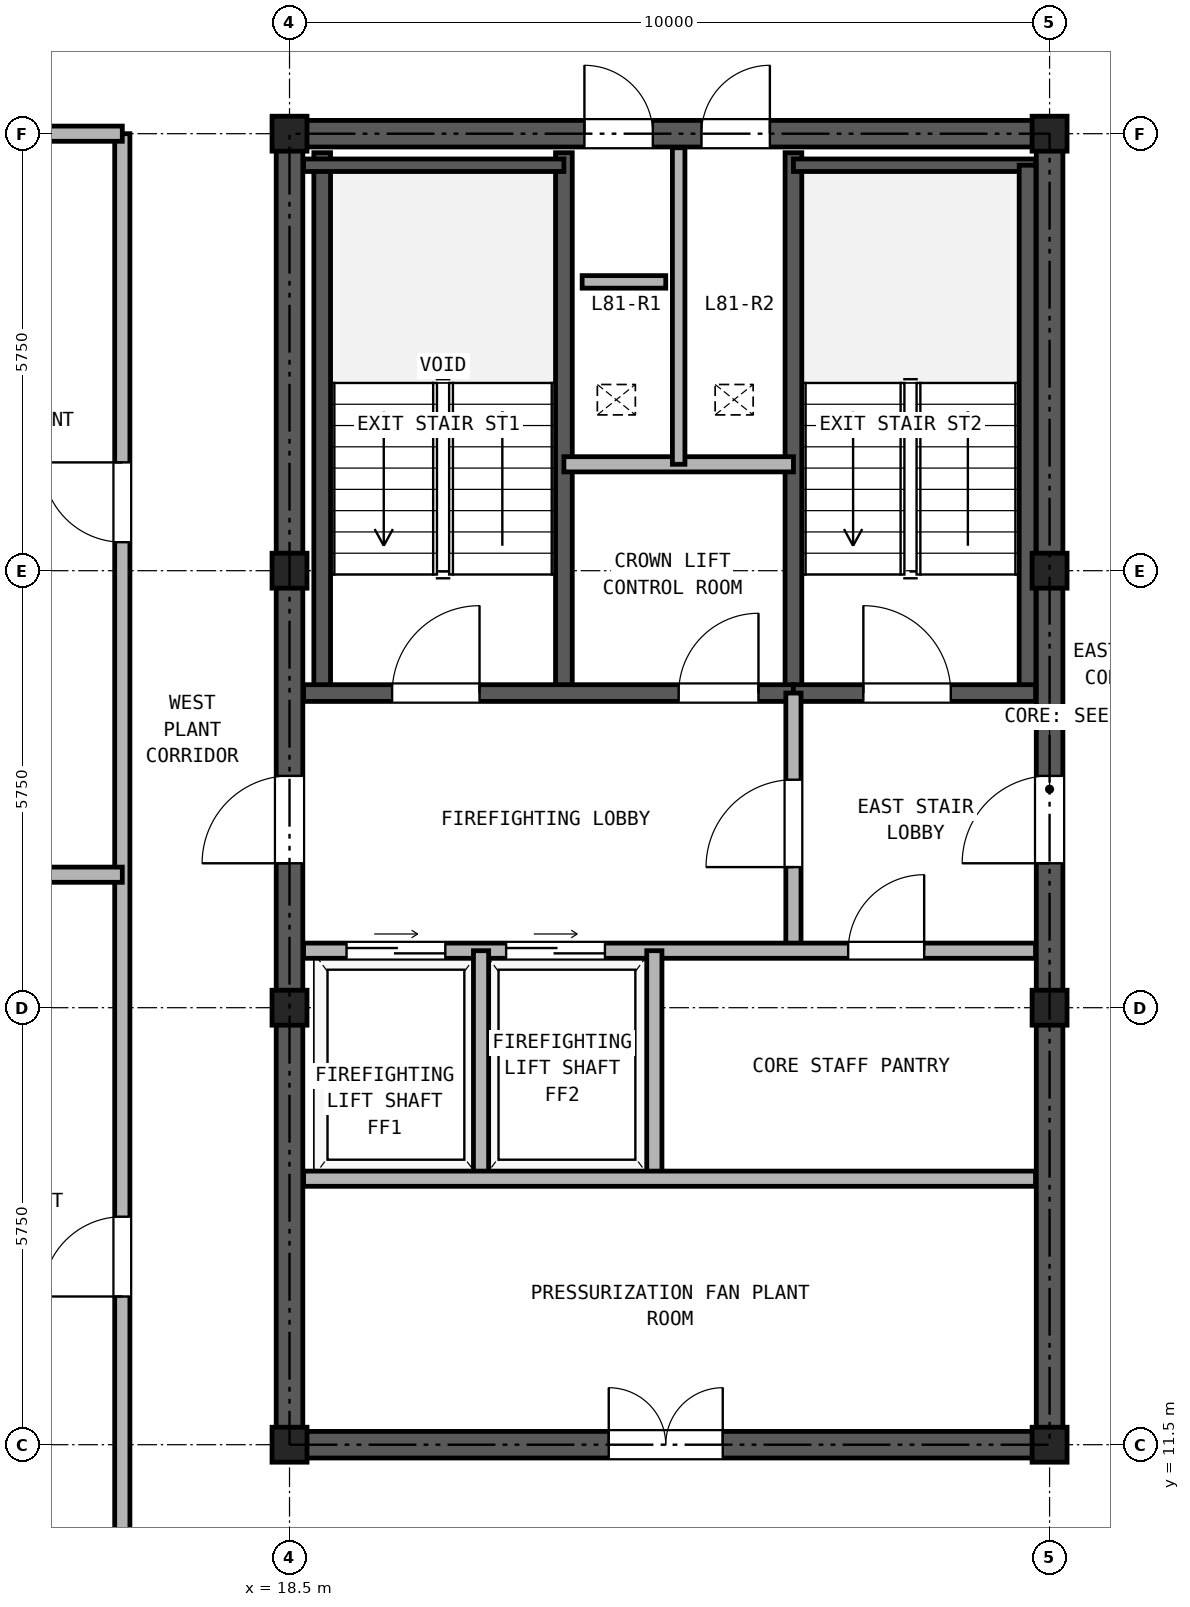
"""IFC4 building model, lengths in metres.
Left out: names, types, materials, properties, quantities, classifications, styles, units other than length and angle.
Written with IfcOpenShell. Run it as: python <this file> out.ifc"""

import sys

from ifc_helpers import new_model, si_unit, direction, frame, frame_2d, origin, origin_2d, place, context, subcontext, project, spatial, rectangle, hollow_rectangle, extrude, source, transform, mapped, element, fill, save


model = new_model("IFC4")
c1 = context("Model", 3, precision=1e-05, world=origin(), true_north=direction((0.0, 1.0)))
c2 = subcontext(c1, "Body", "Model", "MODEL_VIEW")
j1 = project(units=[si_unit("LENGTHUNIT", "METRE"), si_unit("PLANEANGLEUNIT", "RADIAN")], contexts=[c1])
p1 = place(None, origin())
s1 = spatial("IfcSite", under=j1, at=p1, CompositionType="ELEMENT")
p2 = place(p1, origin())
s2 = spatial("IfcBuilding", under=s1, at=p2, CompositionType="ELEMENT")
p3 = place(p2, frame((0.0, 0.0, 282.1)))
s3 = spatial("IfcBuildingStorey", under=s2, at=p3, CompositionType="ELEMENT", Elevation=282.1)
m1 = source(origin(), c2, "Body", "SweptSolid", [
    extrude(hollow_rectangle(XDim=0.46, YDim=0.46, WallThickness=0.025, at=origin_2d()), origin(), (0.0, 0.0, 1.0), 3.38),
])
for number, where, z_axis, x_axis in (
    (1, (18.5, 11.5, 0.0), (0.0, 0.0, 1.0), (1.0, 0.0, 0.0)),
    (2, (18.5, 17.25, 0.0), (0.0, 0.0, 1.0), (1.0, 0.0, 0.0)),
    (3, (18.5, 23.0, 0.0), (0.0, 0.0, 1.0), (1.0, 0.0, 0.0)),
    (4, (18.5, 28.75, 0.0), (0.0, 0.0, 1.0), (1.0, 0.0, 0.0)),
    (5, (28.5, 11.5, 0.0), (0.0, 0.0, 1.0), (1.0, 0.0, 0.0)),
    (6, (28.5, 17.25, 0.0), (0.0, 0.0, 1.0), (1.0, 0.0, 0.0)),
    (7, (28.5, 23.0, 0.0), (0.0, 0.0, 1.0), (1.0, 0.0, 0.0)),
    (8, (28.5, 28.75, 0.0), (0.0, 0.0, 1.0), (1.0, 0.0, 0.0)),
):
    element("IfcColumn", number, at=place(p3, frame(where, z_axis=z_axis, x_axis=x_axis)), inside=s3, PredefinedType="COLUMN", context=c2, shape_type="MappedRepresentation", body=[
        mapped(m1, transform((0.0, 0.0, 0.0), x_axis=(1.0, 0.0, 0.0), y_axis=(0.0, 1.0, 0.0), z_axis=(0.0, 0.0, 1.0), scale=1.0)),
    ])
p4 = place(p3, frame((18.325, 11.5, 0.0), z_axis=(0.0, 0.0, 1.0), x_axis=(1.0, 0.0, 0.0)))
e9 = element("IfcWall", 9, at=p4, inside=s3, PredefinedType="SHEAR", context=c2, shape_type="SweptSolid", body=[
    extrude(rectangle(XDim=10.35, YDim=0.35, at=frame_2d((5.175, 0.0))), origin(), (0.0, 0.0, 1.0), 3.38),
])
p5 = place(p4, frame((4.375, 0.0, 0.0)))
e10 = element("IfcOpeningElement", 10, at=p5, cuts=e9, PredefinedType="OPENING", context=c2, shape_type="SweptSolid", body=[
    extrude(rectangle(XDim=1.5, YDim=2.25, at=frame_2d((0.75, 1.125))), frame((0.0, 0.185, 0.0), z_axis=(0.0, -1.0, 0.0), x_axis=(1.0, 0.0, 0.0)), (0.0, 0.0, 1.0), 0.37),
])
p6 = place(p3, frame((18.325, 28.75, 0.0), z_axis=(0.0, 0.0, 1.0), x_axis=(1.0, 0.0, 0.0)))
e11 = element("IfcWall", 11, at=p6, inside=s3, PredefinedType="SHEAR", context=c2, shape_type="SweptSolid", body=[
    extrude(rectangle(XDim=10.35, YDim=0.35, at=frame_2d((5.175, 0.0))), origin(), (0.0, 0.0, 1.0), 3.38),
])
p7 = place(p6, frame((4.055, 0.0, 0.0)))
e12 = element("IfcOpeningElement", 12, at=p7, cuts=e11, PredefinedType="OPENING", context=c2, shape_type="SweptSolid", body=[
    extrude(rectangle(XDim=0.9, YDim=2.05, at=frame_2d((0.45, 1.025))), frame((0.0, 0.185, 0.0), z_axis=(0.0, -1.0, 0.0), x_axis=(1.0, 0.0, 0.0)), (0.0, 0.0, 1.0), 0.37),
])
p8 = place(p6, frame((5.595, 0.0, 0.0)))
e13 = element("IfcOpeningElement", 13, at=p8, cuts=e11, PredefinedType="OPENING", context=c2, shape_type="SweptSolid", body=[
    extrude(rectangle(XDim=0.9, YDim=2.05, at=frame_2d((0.45, 1.025))), frame((0.0, 0.185, 0.0), z_axis=(0.0, -1.0, 0.0), x_axis=(1.0, 0.0, 0.0)), (0.0, 0.0, 1.0), 0.37),
])
p9 = place(p3, frame((18.5, 11.675, 0.0), z_axis=(0.0, 0.0, 1.0), x_axis=(0.0, 1.0, 0.0)))
e14 = element("IfcWall", 14, at=p9, inside=s3, PredefinedType="SHEAR", context=c2, shape_type="SweptSolid", body=[
    extrude(rectangle(XDim=16.9, YDim=0.35, at=frame_2d((8.45, 0.0))), origin(), (0.0, 0.0, 1.0), 3.38),
])
p10 = place(p9, frame((7.475, 0.0, 0.0)))
e15 = element("IfcOpeningElement", 15, at=p10, cuts=e14, PredefinedType="OPENING", context=c2, shape_type="SweptSolid", body=[
    extrude(rectangle(XDim=1.15, YDim=2.2, at=frame_2d((0.575, 1.1))), frame((0.0, 0.185, 0.0), z_axis=(0.0, -1.0, 0.0), x_axis=(1.0, 0.0, 0.0)), (0.0, 0.0, 1.0), 0.37),
])
p11 = place(p3, frame((28.5, 11.675, 0.0), z_axis=(0.0, 0.0, 1.0), x_axis=(0.0, 1.0, 0.0)))
e16 = element("IfcWall", 16, at=p11, inside=s3, PredefinedType="SHEAR", context=c2, shape_type="SweptSolid", body=[
    extrude(rectangle(XDim=16.9, YDim=0.35, at=frame_2d((8.45, 0.0))), origin(), (0.0, 0.0, 1.0), 3.38),
])
p12 = place(p11, frame((7.475, 0.0, 0.0)))
e17 = element("IfcOpeningElement", 17, at=p12, cuts=e16, PredefinedType="OPENING", context=c2, shape_type="SweptSolid", body=[
    extrude(rectangle(XDim=1.15, YDim=2.2, at=frame_2d((0.575, 1.1))), frame((0.0, 0.185, 0.0), z_axis=(0.0, -1.0, 0.0), x_axis=(1.0, 0.0, 0.0)), (0.0, 0.0, 1.0), 0.37),
])
for number, where, z_axis, x_axis in (
    (18, (18.93, 21.39, 0.0), (0.0, 0.0, 1.0), (0.0, 1.0, 0.0)),
    (19, (22.11, 21.39, 0.0), (0.0, 0.0, 1.0), (0.0, 1.0, 0.0)),
    (20, (25.13, 21.39, 0.0), (0.0, 0.0, 1.0), (0.0, 1.0, 0.0)),
):
    element("IfcWall", number, at=place(p3, frame(where, z_axis=z_axis, x_axis=x_axis)), inside=s3, PredefinedType="SOLIDWALL", context=c2, shape_type="SweptSolid", body=[
        extrude(rectangle(XDim=7.11, YDim=0.22, at=frame_2d((3.555, 0.0))), origin(), (0.0, 0.0, 1.0), 3.38),
    ])
p13 = place(p3, frame((18.685, 28.335, 0.0), z_axis=(0.0, 0.0, 1.0), x_axis=(1.0, 0.0, 0.0)))
e21 = element("IfcWall", 21, at=p13, inside=s3, PredefinedType="PARTITIONING", context=c2, shape_type="SweptSolid", body=[
    extrude(rectangle(XDim=3.425, YDim=0.165, at=frame_2d((1.712, 0.0))), origin(), (0.0, 0.0, 1.0), 3.38),
])
p14 = place(p3, frame((25.13, 28.335, 0.0), z_axis=(0.0, 0.0, 1.0), x_axis=(1.0, 0.0, 0.0)))
e22 = element("IfcWall", 22, at=p14, inside=s3, PredefinedType="PARTITIONING", context=c2, shape_type="SweptSolid", body=[
    extrude(rectangle(XDim=3.185, YDim=0.165, at=frame_2d((1.593, 0.0))), origin(), (0.0, 0.0, 1.0), 3.38),
])
p15 = place(p3, frame((28.21, 21.39, 0.0), z_axis=(0.0, 0.0, 1.0), x_axis=(0.0, 1.0, 0.0)))
e23 = element("IfcWall", 23, at=p15, inside=s3, PredefinedType="SOLIDWALL", context=c2, shape_type="SweptSolid", body=[
    extrude(rectangle(XDim=6.945, YDim=0.22, at=frame_2d((3.473, 0.0))), origin(), (0.0, 0.0, 1.0), 3.38),
])
p16 = place(p3, frame((18.685, 21.39, 0.0), z_axis=(0.0, 0.0, 1.0), x_axis=(1.0, 0.0, 0.0)))
e24 = element("IfcWall", 24, at=p16, inside=s3, PredefinedType="SOLIDWALL", context=c2, shape_type="SweptSolid", body=[
    extrude(rectangle(XDim=6.445, YDim=0.22, at=frame_2d((3.222, 0.0))), origin(), (0.0, 0.0, 1.0), 3.38),
])
p17 = place(p16, frame((1.165, 0.0, 0.0)))
e25 = element("IfcOpeningElement", 25, at=p17, cuts=e24, PredefinedType="OPENING", context=c2, shape_type="SweptSolid", body=[
    extrude(rectangle(XDim=1.15, YDim=2.2, at=frame_2d((0.575, 1.1))), frame((0.0, 0.12, 0.0), z_axis=(0.0, -1.0, 0.0), x_axis=(1.0, 0.0, 0.0)), (0.0, 0.0, 1.0), 0.24),
])
p18 = place(p16, frame((4.935, 0.0, 0.0)))
e26 = element("IfcOpeningElement", 26, at=p18, cuts=e24, PredefinedType="OPENING", context=c2, shape_type="SweptSolid", body=[
    extrude(rectangle(XDim=1.05, YDim=2.15, at=frame_2d((0.525, 1.075))), frame((0.0, 0.12, 0.0), z_axis=(0.0, -1.0, 0.0), x_axis=(1.0, 0.0, 0.0)), (0.0, 0.0, 1.0), 0.24),
])
p19 = place(p3, frame((25.13, 21.39, 0.0), z_axis=(0.0, 0.0, 1.0), x_axis=(1.0, 0.0, 0.0)))
e27 = element("IfcWall", 27, at=p19, inside=s3, PredefinedType="SOLIDWALL", context=c2, shape_type="SweptSolid", body=[
    extrude(rectangle(XDim=3.185, YDim=0.22, at=frame_2d((1.593, 0.0))), origin(), (0.0, 0.0, 1.0), 3.38),
])
p20 = place(p19, frame((0.92, 0.0, 0.0)))
e28 = element("IfcOpeningElement", 28, at=p20, cuts=e27, PredefinedType="OPENING", context=c2, shape_type="SweptSolid", body=[
    extrude(rectangle(XDim=1.15, YDim=2.2, at=frame_2d((0.575, 1.1))), frame((0.0, 0.12, 0.0), z_axis=(0.0, -1.0, 0.0), x_axis=(1.0, 0.0, 0.0)), (0.0, 0.0, 1.0), 0.24),
])
p21 = place(p3, frame((22.11, 24.4, 0.0), z_axis=(0.0, 0.0, 1.0), x_axis=(1.0, 0.0, 0.0)))
e29 = element("IfcWall", 29, at=p21, inside=s3, PredefinedType="PARTITIONING", context=c2, shape_type="SweptSolid", body=[
    extrude(rectangle(XDim=3.02, YDim=0.2, at=frame_2d((1.51, 0.0))), origin(), (0.0, 0.0, 1.0), 3.38),
])
p22 = place(p3, frame((23.62, 24.4, 0.0), z_axis=(0.0, 0.0, 1.0), x_axis=(0.0, 1.0, 0.0)))
e30 = element("IfcWall", 30, at=p22, inside=s3, PredefinedType="PARTITIONING", context=c2, shape_type="SweptSolid", body=[
    extrude(rectangle(XDim=4.165, YDim=0.165, at=frame_2d((2.083, 0.0))), origin(), (0.0, 0.0, 1.0), 3.38),
])
p23 = place(p3, frame((25.13, 18.0, 0.0), z_axis=(0.0, 0.0, 1.0), x_axis=(0.0, 1.0, 0.0)))
e31 = element("IfcWall", 31, at=p23, inside=s3, PredefinedType="PARTITIONING", context=c2, shape_type="SweptSolid", body=[
    extrude(rectangle(XDim=3.39, YDim=0.2, at=frame_2d((1.695, 0.0))), origin(), (0.0, 0.0, 1.0), 3.38),
])
p24 = place(p23, frame((1.1, 0.0, 0.0)))
e32 = element("IfcOpeningElement", 32, at=p24, cuts=e31, PredefinedType="OPENING", context=c2, shape_type="SweptSolid", body=[
    extrude(rectangle(XDim=1.15, YDim=2.2, at=frame_2d((0.575, 1.1))), frame((0.0, 0.11, 0.0), z_axis=(0.0, -1.0, 0.0), x_axis=(1.0, 0.0, 0.0)), (0.0, 0.0, 1.0), 0.22),
])
p25 = place(p3, frame((18.685, 18.0, 0.0), z_axis=(0.0, 0.0, 1.0), x_axis=(1.0, 0.0, 0.0)))
e33 = element("IfcWall", 33, at=p25, inside=s3, PredefinedType="PARTITIONING", context=c2, shape_type="SweptSolid", body=[
    extrude(rectangle(XDim=9.63, YDim=0.2, at=frame_2d((4.815, 0.0))), origin(), (0.0, 0.0, 1.0), 3.38),
])
p26 = place(p25, frame((0.565, 0.0, 0.0)))
e34 = element("IfcOpeningElement", 34, at=p26, cuts=e33, PredefinedType="OPENING", context=c2, shape_type="SweptSolid", body=[
    extrude(rectangle(XDim=1.3, YDim=2.3, at=frame_2d((0.65, 1.15))), frame((0.0, 0.11, 0.0), z_axis=(0.0, -1.0, 0.0), x_axis=(1.0, 0.0, 0.0)), (0.0, 0.0, 1.0), 0.22),
])
p27 = place(p25, frame((2.665, 0.0, 0.0)))
e35 = element("IfcOpeningElement", 35, at=p27, cuts=e33, PredefinedType="OPENING", context=c2, shape_type="SweptSolid", body=[
    extrude(rectangle(XDim=1.3, YDim=2.3, at=frame_2d((0.65, 1.15))), frame((0.0, 0.11, 0.0), z_axis=(0.0, -1.0, 0.0), x_axis=(1.0, 0.0, 0.0)), (0.0, 0.0, 1.0), 0.22),
])
p28 = place(p25, frame((7.165, 0.0, 0.0)))
e36 = element("IfcOpeningElement", 36, at=p28, cuts=e33, PredefinedType="OPENING", context=c2, shape_type="SweptSolid", body=[
    extrude(rectangle(XDim=1.0, YDim=2.15, at=frame_2d((0.5, 1.075))), frame((0.0, 0.11, 0.0), z_axis=(0.0, -1.0, 0.0), x_axis=(1.0, 0.0, 0.0)), (0.0, 0.0, 1.0), 0.22),
])
for number, where, z_axis, x_axis in (
    (37, (21.02, 15.0, 0.0), (0.0, 0.0, 1.0), (0.0, 1.0, 0.0)),
    (38, (23.3, 15.0, 0.0), (0.0, 0.0, 1.0), (0.0, 1.0, 0.0)),
):
    element("IfcWall", number, at=place(p3, frame(where, z_axis=z_axis, x_axis=x_axis)), inside=s3, PredefinedType="PARTITIONING", context=c2, shape_type="SweptSolid", body=[
        extrude(rectangle(XDim=3.0, YDim=0.2, at=frame_2d((1.5, 0.0))), origin(), (0.0, 0.0, 1.0), 3.38),
    ])
p29 = place(p3, frame((18.685, 15.0, 0.0), z_axis=(0.0, 0.0, 1.0), x_axis=(1.0, 0.0, 0.0)))
e39 = element("IfcWall", 39, at=p29, inside=s3, PredefinedType="PARTITIONING", context=c2, shape_type="SweptSolid", body=[
    extrude(rectangle(XDim=9.63, YDim=0.2, at=frame_2d((4.815, 0.0))), origin(), (0.0, 0.0, 1.0), 3.38),
])
p30 = place(p3, frame((16.3, 8.9, 0.0), z_axis=(0.0, 0.0, 1.0), x_axis=(0.0, 1.0, 0.0)))
e40 = element("IfcWall", 40, at=p30, inside=s3, PredefinedType="PARTITIONING", context=c2, shape_type="SweptSolid", body=[
    extrude(rectangle(XDim=19.85, YDim=0.2, at=frame_2d((9.925, 0.0))), origin(), (0.0, 0.0, 1.0), 3.38),
])
p31 = place(p30, frame((4.55, 0.0, 0.0)))
e41 = element("IfcOpeningElement", 41, at=p31, cuts=e40, PredefinedType="OPENING", context=c2, shape_type="SweptSolid", body=[
    extrude(rectangle(XDim=1.05, YDim=2.15, at=frame_2d((0.525, 1.075))), frame((0.0, 0.11, 0.0), z_axis=(0.0, -1.0, 0.0), x_axis=(1.0, 0.0, 0.0)), (0.0, 0.0, 1.0), 0.22),
])
p32 = place(p30, frame((14.475, 0.0, 0.0)))
e42 = element("IfcOpeningElement", 42, at=p32, cuts=e40, PredefinedType="OPENING", context=c2, shape_type="SweptSolid", body=[
    extrude(rectangle(XDim=1.05, YDim=2.15, at=frame_2d((0.525, 1.075))), frame((0.0, 0.11, 0.0), z_axis=(0.0, -1.0, 0.0), x_axis=(1.0, 0.0, 0.0)), (0.0, 0.0, 1.0), 0.22),
])
p33 = place(p3, frame((12.45, 28.75, 0.0), z_axis=(0.0, 0.0, 1.0), x_axis=(1.0, 0.0, 0.0)))
e43 = element("IfcWall", 43, at=p33, inside=s3, PredefinedType="PARTITIONING", context=c2, shape_type="SweptSolid", body=[
    extrude(rectangle(XDim=3.85, YDim=0.2, at=frame_2d((1.925, 0.0))), origin(), (0.0, 0.0, 1.0), 2.905),
])
p34 = place(p3, frame((12.45, 19.0, 0.0), z_axis=(0.0, 0.0, 1.0), x_axis=(1.0, 0.0, 0.0)))
e44 = element("IfcWall", 44, at=p34, inside=s3, PredefinedType="PARTITIONING", context=c2, shape_type="SweptSolid", body=[
    extrude(rectangle(XDim=3.85, YDim=0.2, at=frame_2d((1.925, 0.0))), origin(), (0.0, 0.0, 1.0), 3.38),
])
p35 = place(p3, frame((22.35, 26.8, 0.0), z_axis=(0.0, 0.0, 1.0), x_axis=(1.0, 0.0, 0.0)))
e45 = element("IfcWall", 45, at=p35, inside=s3, PredefinedType="PARTITIONING", context=c2, shape_type="SweptSolid", body=[
    extrude(rectangle(XDim=1.1, YDim=0.165, at=frame_2d((0.55, 0.0))), origin(), (0.0, 0.0, 1.0), 3.38),
])
p36 = place(p17, frame((1.15, 0.0, 0.0), z_axis=(0.0, 0.0, 1.0), x_axis=(-1.0, 0.0, 0.0)))
e46 = element("IfcDoor", 46, at=p36, inside=s3, OperationType="SINGLE_SWING_RIGHT", PredefinedType="DOOR", context=c2, shape_type="SweptSolid", body=[
    extrude(rectangle(XDim=1.15, YDim=2.2, at=frame_2d((0.575, 1.1))), frame((0.0, 0.025, 0.0), z_axis=(0.0, -1.0, 0.0), x_axis=(1.0, 0.0, 0.0)), (0.0, 0.0, 1.0), 0.05),
])
fill(e25, e46)
p37 = place(p20, frame((1.15, 0.0, 0.0), z_axis=(0.0, 0.0, 1.0), x_axis=(-1.0, 0.0, 0.0)))
e47 = element("IfcDoor", 47, at=p37, inside=s3, OperationType="SINGLE_SWING_LEFT", PredefinedType="DOOR", context=c2, shape_type="SweptSolid", body=[
    extrude(rectangle(XDim=1.15, YDim=2.2, at=frame_2d((0.575, 1.1))), frame((0.0, 0.025, 0.0), z_axis=(0.0, -1.0, 0.0), x_axis=(1.0, 0.0, 0.0)), (0.0, 0.0, 1.0), 0.05),
])
fill(e28, e47)
p38 = place(p18, origin())
e48 = element("IfcDoor", 48, at=p38, inside=s3, OperationType="SINGLE_SWING_RIGHT", PredefinedType="DOOR", context=c2, shape_type="SweptSolid", body=[
    extrude(rectangle(XDim=1.05, YDim=2.15, at=frame_2d((0.525, 1.075))), frame((0.0, 0.025, 0.0), z_axis=(0.0, -1.0, 0.0), x_axis=(1.0, 0.0, 0.0)), (0.0, 0.0, 1.0), 0.05),
])
fill(e26, e48)
p39 = place(p24, origin())
e49 = element("IfcDoor", 49, at=p39, inside=s3, OperationType="SINGLE_SWING_LEFT", PredefinedType="DOOR", context=c2, shape_type="SweptSolid", body=[
    extrude(rectangle(XDim=1.15, YDim=2.2, at=frame_2d((0.575, 1.1))), frame((0.0, 0.025, 0.0), z_axis=(0.0, -1.0, 0.0), x_axis=(1.0, 0.0, 0.0)), (0.0, 0.0, 1.0), 0.05),
])
fill(e32, e49)
p40 = place(p26, origin())
e50 = element("IfcDoor", 50, at=p40, inside=s3, OperationType="DOUBLE_DOOR_SLIDING", PredefinedType="DOOR", context=c2, shape_type="SweptSolid", body=[
    extrude(rectangle(XDim=1.3, YDim=2.3, at=frame_2d((0.65, 1.15))), frame((0.0, 0.025, 0.0), z_axis=(0.0, -1.0, 0.0), x_axis=(1.0, 0.0, 0.0)), (0.0, 0.0, 1.0), 0.05),
])
fill(e34, e50)
p41 = place(p27, origin())
e51 = element("IfcDoor", 51, at=p41, inside=s3, OperationType="DOUBLE_DOOR_SLIDING", PredefinedType="DOOR", context=c2, shape_type="SweptSolid", body=[
    extrude(rectangle(XDim=1.3, YDim=2.3, at=frame_2d((0.65, 1.15))), frame((0.0, 0.025, 0.0), z_axis=(0.0, -1.0, 0.0), x_axis=(1.0, 0.0, 0.0)), (0.0, 0.0, 1.0), 0.05),
])
fill(e35, e51)
p42 = place(p28, frame((1.0, 0.0, 0.0), z_axis=(0.0, 0.0, 1.0), x_axis=(-1.0, 0.0, 0.0)))
e52 = element("IfcDoor", 52, at=p42, inside=s3, OperationType="SINGLE_SWING_RIGHT", PredefinedType="DOOR", context=c2, shape_type="SweptSolid", body=[
    extrude(rectangle(XDim=1.0, YDim=2.15, at=frame_2d((0.5, 1.075))), frame((0.0, 0.025, 0.0), z_axis=(0.0, -1.0, 0.0), x_axis=(1.0, 0.0, 0.0)), (0.0, 0.0, 1.0), 0.05),
])
fill(e36, e52)
p43 = place(p10, frame((1.15, 0.0, 0.0), z_axis=(0.0, 0.0, 1.0), x_axis=(-1.0, 0.0, 0.0)))
e53 = element("IfcDoor", 53, at=p43, inside=s3, OperationType="SINGLE_SWING_LEFT", PredefinedType="DOOR", context=c2, shape_type="SweptSolid", body=[
    extrude(rectangle(XDim=1.15, YDim=2.2, at=frame_2d((0.575, 1.1))), frame((0.0, 0.025, 0.0), z_axis=(0.0, -1.0, 0.0), x_axis=(1.0, 0.0, 0.0)), (0.0, 0.0, 1.0), 0.05),
])
fill(e15, e53)
p44 = place(p12, origin())
e54 = element("IfcDoor", 54, at=p44, inside=s3, OperationType="SINGLE_SWING_LEFT", PredefinedType="DOOR", context=c2, shape_type="SweptSolid", body=[
    extrude(rectangle(XDim=1.15, YDim=2.2, at=frame_2d((0.575, 1.1))), frame((0.0, 0.025, 0.0), z_axis=(0.0, -1.0, 0.0), x_axis=(1.0, 0.0, 0.0)), (0.0, 0.0, 1.0), 0.05),
])
fill(e17, e54)
p45 = place(p7, origin())
e55 = element("IfcDoor", 55, at=p45, inside=s3, OperationType="SINGLE_SWING_LEFT", PredefinedType="DOOR", context=c2, shape_type="SweptSolid", body=[
    extrude(rectangle(XDim=0.9, YDim=2.05, at=frame_2d((0.45, 1.025))), frame((0.0, 0.025, 0.0), z_axis=(0.0, -1.0, 0.0), x_axis=(1.0, 0.0, 0.0)), (0.0, 0.0, 1.0), 0.05),
])
fill(e12, e55)
p46 = place(p8, origin())
e56 = element("IfcDoor", 56, at=p46, inside=s3, OperationType="SINGLE_SWING_RIGHT", PredefinedType="DOOR", context=c2, shape_type="SweptSolid", body=[
    extrude(rectangle(XDim=0.9, YDim=2.05, at=frame_2d((0.45, 1.025))), frame((0.0, 0.025, 0.0), z_axis=(0.0, -1.0, 0.0), x_axis=(1.0, 0.0, 0.0)), (0.0, 0.0, 1.0), 0.05),
])
fill(e13, e56)
p47 = place(p5, frame((1.5, 0.0, 0.0), z_axis=(0.0, 0.0, 1.0), x_axis=(-1.0, 0.0, 0.0)))
e57 = element("IfcDoor", 57, at=p47, inside=s3, OperationType="DOUBLE_DOOR_SINGLE_SWING", PredefinedType="DOOR", context=c2, shape_type="SweptSolid", body=[
    extrude(rectangle(XDim=1.5, YDim=2.25, at=frame_2d((0.75, 1.125))), frame((0.0, 0.025, 0.0), z_axis=(0.0, -1.0, 0.0), x_axis=(1.0, 0.0, 0.0)), (0.0, 0.0, 1.0), 0.05),
])
fill(e10, e57)
p48 = place(p31, frame((1.05, 0.0, 0.0), z_axis=(0.0, 0.0, 1.0), x_axis=(-1.0, 0.0, 0.0)))
e58 = element("IfcDoor", 58, at=p48, inside=s3, OperationType="SINGLE_SWING_LEFT", PredefinedType="DOOR", context=c2, shape_type="SweptSolid", body=[
    extrude(rectangle(XDim=1.05, YDim=2.15, at=frame_2d((0.525, 1.075))), frame((0.0, 0.025, 0.0), z_axis=(0.0, -1.0, 0.0), x_axis=(1.0, 0.0, 0.0)), (0.0, 0.0, 1.0), 0.05),
])
fill(e41, e58)
p49 = place(p32, frame((1.05, 0.0, 0.0), z_axis=(0.0, 0.0, 1.0), x_axis=(-1.0, 0.0, 0.0)))
e59 = element("IfcDoor", 59, at=p49, inside=s3, OperationType="SINGLE_SWING_RIGHT", PredefinedType="DOOR", context=c2, shape_type="SweptSolid", body=[
    extrude(rectangle(XDim=1.05, YDim=2.15, at=frame_2d((0.525, 1.075))), frame((0.0, 0.025, 0.0), z_axis=(0.0, -1.0, 0.0), x_axis=(1.0, 0.0, 0.0)), (0.0, 0.0, 1.0), 0.05),
])
fill(e42, e59)
save(model, sys.argv[1])
